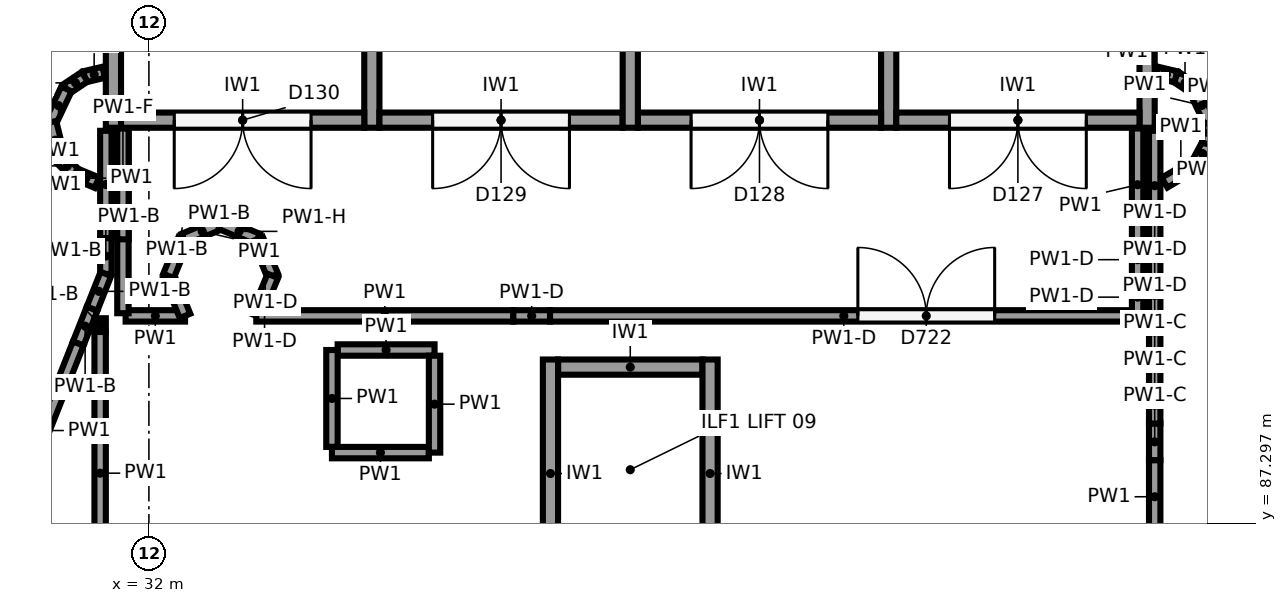
"""IFC4 building model, lengths in metres.
Left out: names, types, materials, properties, quantities, classifications, styles, units other than length and angle.
Written with IfcOpenShell. Run it as: python <this file> out.ifc"""

import sys

from ifc_helpers import new_model, si_unit, direction, frame, frame_2d, origin, origin_2d, place, context, subcontext, project, spatial, rectangle, circle, extrude, element, fill, save


model = new_model("IFC4")
c1 = context("Model", 3, precision=1e-05, world=origin(), true_north=direction((0.0, 1.0)))
c2 = subcontext(c1, "Body", "Model", "MODEL_VIEW")
j1 = project(units=[si_unit("LENGTHUNIT", "METRE"), si_unit("PLANEANGLEUNIT", "RADIAN")], contexts=[c1])
p1 = place(None, origin())
s1 = spatial("IfcSite", under=j1, at=p1, CompositionType="ELEMENT")
p2 = place(p1, origin())
s2 = spatial("IfcBuilding", under=s1, at=p2, CompositionType="ELEMENT")
p3 = place(p2, frame((0.0, 0.0, -4.0)))
s3 = spatial("IfcBuildingStorey", under=s2, at=p3, CompositionType="ELEMENT", Elevation=-4.0)
p4 = place(p3, frame((46.333, 90.126, -1.2), z_axis=(0.0, 0.0, 1.0), x_axis=(1.0, 0.0, 0.0)))
e1 = element("IfcColumn", 1, at=p4, inside=s3, PredefinedType="COLUMN", context=c2, shape_type="SweptSolid", body=[
    extrude(circle(Radius=0.45, at=origin_2d()), origin(), (0.0, 0.0, 1.0), 5.2),
])
p5 = place(p3, frame((32.944, 90.551, -1.2), z_axis=(0.0, 0.0, 1.0), x_axis=(1.0, 0.0, 0.0)))
e2 = element("IfcColumn", 2, at=p5, inside=s3, PredefinedType="COLUMN", context=c2, shape_type="SweptSolid", body=[
    extrude(circle(Radius=0.55, at=origin_2d()), origin(), (0.0, 0.0, 1.0), 5.2),
])
for number, where, z_axis, x_axis in (
    (3, (45.133, 101.6, -1.2), (0.0, 0.0, 1.0), (0.0, -1.0, 0.0)),
    (4, (38.333, 101.6, -1.2), (0.0, 0.0, 1.0), (0.0, -1.0, 0.0)),
    (5, (31.533, 101.6, -1.2), (0.0, 0.0, 1.0), (0.0, -1.0, 0.0)),
    (6, (41.733, 101.6, -1.2), (0.0, 0.0, 1.0), (0.0, -1.0, 0.0)),
    (7, (34.933, 101.6, -1.2), (0.0, 0.0, 1.0), (0.0, -1.0, 0.0)),
):
    element("IfcWall", number, at=place(p3, frame(where, z_axis=z_axis, x_axis=x_axis)), inside=s3, PredefinedType="SHEAR", context=c2, shape_type="SweptSolid", body=[
        extrude(rectangle(XDim=9.1, YDim=0.2, at=frame_2d((4.55, 0.0))), origin(), (0.0, 0.0, 1.0), 4.8),
    ])
p6 = place(p3, frame((45.033, 92.6, -1.2), z_axis=(0.0, 0.0, 1.0), x_axis=(-1.0, 0.0, 0.0)))
e8 = element("IfcWall", 8, at=p6, inside=s3, PredefinedType="SHEAR", context=c2, shape_type="SweptSolid", body=[
    extrude(rectangle(XDim=3.2, YDim=0.2, at=frame_2d((1.6, 0.0))), origin(), (0.0, 0.0, 1.0), 4.8),
])
p7 = place(p6, frame((0.7, 0.0, 1.2)))
e9 = element("IfcOpeningElement", 9, at=p7, cuts=e8, PredefinedType="OPENING", context=c2, shape_type="SweptSolid", body=[
    extrude(rectangle(XDim=1.8, YDim=2.1, at=frame_2d((0.9, 1.05))), frame((0.0, 0.11, 0.0), z_axis=(0.0, -1.0, 0.0), x_axis=(1.0, 0.0, 0.0)), (0.0, 0.0, 1.0), 0.22),
])
p8 = place(p3, frame((41.633, 92.6, -1.2), z_axis=(0.0, 0.0, 1.0), x_axis=(-1.0, 0.0, 0.0)))
e10 = element("IfcWall", 10, at=p8, inside=s3, PredefinedType="SHEAR", context=c2, shape_type="SweptSolid", body=[
    extrude(rectangle(XDim=3.2, YDim=0.2, at=frame_2d((1.6, 0.0))), origin(), (0.0, 0.0, 1.0), 4.8),
])
p9 = place(p8, frame((0.7, 0.0, 1.2)))
e11 = element("IfcOpeningElement", 11, at=p9, cuts=e10, PredefinedType="OPENING", context=c2, shape_type="SweptSolid", body=[
    extrude(rectangle(XDim=1.8, YDim=2.1, at=frame_2d((0.9, 1.05))), frame((0.0, 0.11, 0.0), z_axis=(0.0, -1.0, 0.0), x_axis=(1.0, 0.0, 0.0)), (0.0, 0.0, 1.0), 0.22),
])
p10 = place(p3, frame((38.233, 92.6, -1.2), z_axis=(0.0, 0.0, 1.0), x_axis=(-1.0, 0.0, 0.0)))
e12 = element("IfcWall", 12, at=p10, inside=s3, PredefinedType="SHEAR", context=c2, shape_type="SweptSolid", body=[
    extrude(rectangle(XDim=3.2, YDim=0.2, at=frame_2d((1.6, 0.0))), origin(), (0.0, 0.0, 1.0), 4.8),
])
p11 = place(p10, frame((0.7, 0.0, 1.2)))
e13 = element("IfcOpeningElement", 13, at=p11, cuts=e12, PredefinedType="OPENING", context=c2, shape_type="SweptSolid", body=[
    extrude(rectangle(XDim=1.8, YDim=2.1, at=frame_2d((0.9, 1.05))), frame((0.0, 0.11, 0.0), z_axis=(0.0, -1.0, 0.0), x_axis=(1.0, 0.0, 0.0)), (0.0, 0.0, 1.0), 0.22),
])
p12 = place(p3, frame((34.833, 92.6, -1.2), z_axis=(0.0, 0.0, 1.0), x_axis=(-1.0, 0.0, 0.0)))
e14 = element("IfcWall", 14, at=p12, inside=s3, PredefinedType="SHEAR", context=c2, shape_type="SweptSolid", body=[
    extrude(rectangle(XDim=3.2, YDim=0.2, at=frame_2d((1.6, 0.0))), origin(), (0.0, 0.0, 1.0), 4.8),
])
p13 = place(p12, frame((0.7, 0.0, 1.2)))
e15 = element("IfcOpeningElement", 15, at=p13, cuts=e14, PredefinedType="OPENING", context=c2, shape_type="SweptSolid", body=[
    extrude(rectangle(XDim=1.8, YDim=2.1, at=frame_2d((0.9, 1.05))), frame((0.0, 0.11, 0.0), z_axis=(0.0, -1.0, 0.0), x_axis=(1.0, 0.0, 0.0)), (0.0, 0.0, 1.0), 0.22),
])
for number, where, z_axis, x_axis in (
    (16, (39.383, 89.451, -1.2), (0.0, 0.0, 1.0), (0.0, -1.0, 0.0)),
    (17, (37.283, 89.451, -1.2), (0.0, 0.0, 1.0), (0.0, -1.0, 0.0)),
):
    element("IfcWall", number, at=place(p3, frame(where, z_axis=z_axis, x_axis=x_axis)), inside=s3, PredefinedType="SHEAR", context=c2, shape_type="SweptSolid", body=[
        extrude(rectangle(XDim=3.0, YDim=0.2, at=frame_2d((1.5, 0.0))), origin(), (0.0, 0.0, 1.0), 4.8),
    ])
p14 = place(p3, frame((39.283, 89.351, -1.2), z_axis=(0.0, 0.0, 1.0), x_axis=(-1.0, 0.0, 0.0)))
e18 = element("IfcWall", 18, at=p14, inside=s3, PredefinedType="SHEAR", context=c2, shape_type="SweptSolid", body=[
    extrude(rectangle(XDim=1.9, YDim=0.2, at=frame_2d((0.95, 0.0))), origin(), (0.0, 0.0, 1.0), 4.8),
])
p15 = place(p3, frame((45.233, 87.164, 0.0), z_axis=(0.0, 0.0, 1.0), x_axis=(0.0, 1.0, 0.0)))
e19 = element("IfcWall", 19, at=p15, inside=s3, PredefinedType="PARTITIONING", context=c2, shape_type="SweptSolid", body=[
    extrude(rectangle(XDim=0.963, YDim=0.15, at=frame_2d((0.481, 0.0))), origin(), (0.0, 0.0, 1.0), 3.6),
])
for number, where, z_axis, x_axis in (
    (20, (45.233, 88.127, 0.0), (0.0, 0.0, 1.0), (0.0, 1.0, 0.0)),
    (21, (45.233, 88.608, 0.0), (0.0, 0.0, 1.0), (0.0, 1.0, 0.0)),
    (22, (45.233, 89.09, 0.0), (0.0, 0.0, 1.0), (0.0, 1.0, 0.0)),
):
    element("IfcWall", number, at=place(p3, frame(where, z_axis=z_axis, x_axis=x_axis)), inside=s3, PredefinedType="PARTITIONING", context=c2, shape_type="SweptSolid", body=[
        extrude(rectangle(XDim=0.481, YDim=0.15, at=frame_2d((0.241, 0.0))), origin(), (0.0, 0.0, 1.0), 2.7),
    ])
for number, where, z_axis, x_axis in (
    (23, (45.233, 89.571, 0.0), (0.0, 0.0, 1.0), (0.0, 1.0, 0.0)),
    (24, (45.233, 90.053, 0.0), (0.0, 0.0, 1.0), (0.0, 1.0, 0.0)),
    (25, (45.233, 90.534, 0.0), (0.0, 0.0, 1.0), (0.0, 1.0, 0.0)),
):
    element("IfcWall", number, at=place(p3, frame(where, z_axis=z_axis, x_axis=x_axis)), inside=s3, PredefinedType="PARTITIONING", context=c2, shape_type="SweptSolid", body=[
        extrude(rectangle(XDim=0.481, YDim=0.15, at=frame_2d((0.241, 0.0))), origin(), (0.0, 0.0, 1.0), 2.3),
    ])
p16 = place(p3, frame((45.233, 91.016, 0.0), z_axis=(0.0, 0.0, 1.0), x_axis=(0.0, 1.0, 0.0)))
e26 = element("IfcWall", 26, at=p16, inside=s3, PredefinedType="PARTITIONING", context=c2, shape_type="SweptSolid", body=[
    extrude(rectangle(XDim=1.444, YDim=0.15, at=frame_2d((0.722, 0.0))), origin(), (0.0, 0.0, 1.0), 3.6),
])
p17 = place(p3, frame((31.433, 92.46, 0.0), z_axis=(0.0, 0.0, 1.0), x_axis=(0.0, -1.0, 0.0)))
e27 = element("IfcWall", 27, at=p17, inside=s3, PredefinedType="PARTITIONING", context=c2, shape_type="SweptSolid", body=[
    extrude(rectangle(XDim=1.413, YDim=0.15, at=frame_2d((0.706, 0.0))), origin(), (0.0, 0.0, 1.0), 3.6),
])
p18 = place(p3, frame((31.433, 91.047, 0.0), z_axis=(0.0, 0.0, 1.0), x_axis=(0.0, -1.0, 0.0)))
e28 = element("IfcWall", 28, at=p18, inside=s3, PredefinedType="PARTITIONING", context=c2, shape_type="SweptSolid", body=[
    extrude(rectangle(XDim=0.471, YDim=0.15, at=frame_2d((0.235, 0.0))), origin(), (0.0, 0.0, 1.0), 2.5),
])
for number, where, z_axis, x_axis in (
    (29, (31.433, 90.577, 0.0), (0.0, 0.0, 1.0), (-0.369, -0.929, 0.0)),
    (30, (31.252, 90.119, 0.0), (0.0, 0.0, 1.0), (-0.369, -0.929, 0.0)),
):
    element("IfcWall", number, at=place(p3, frame(where, z_axis=z_axis, x_axis=x_axis)), inside=s3, PredefinedType="PARTITIONING", context=c2, shape_type="SweptSolid", body=[
        extrude(rectangle(XDim=0.492, YDim=0.15, at=frame_2d((0.246, 0.0))), origin(), (0.0, 0.0, 1.0), 2.5),
    ])
p19 = place(p3, frame((31.07, 89.661, 0.0), z_axis=(0.0, 0.0, 1.0), x_axis=(-0.368825125467, -0.9294988041, 0.0)))
e31 = element("IfcWall", 31, at=p19, inside=s3, PredefinedType="PARTITIONING", context=c2, shape_type="SweptSolid", body=[
    extrude(rectangle(XDim=2.462, YDim=0.15, at=frame_2d((1.231, 0.0))), origin(), (0.0, 0.0, 1.0), 3.6),
])
p20 = place(p3, frame((35.758, 89.576, 0.0), z_axis=(0.0, 0.0, 1.0), x_axis=(-1.0, 0.0, 0.0)))
e32 = element("IfcWall", 32, at=p20, inside=s3, PredefinedType="PARTITIONING", context=c2, shape_type="SweptSolid", body=[
    extrude(rectangle(XDim=1.275, YDim=0.15, at=frame_2d((0.637, 0.0))), origin(), (0.0, 0.0, 1.0), 3.6),
])
for number, where, z_axis, x_axis in (
    (33, (34.408, 89.576, 0.0), (0.0, 0.0, 1.0), (0.0, -1.0, 0.0)),
    (34, (34.408, 88.226, 0.0), (0.0, 0.0, 1.0), (1.0, 0.0, 0.0)),
    (35, (35.758, 88.226, 0.0), (0.0, 0.0, 1.0), (0.0, 1.0, 0.0)),
):
    element("IfcWall", number, at=place(p3, frame(where, z_axis=z_axis, x_axis=x_axis)), inside=s3, PredefinedType="PARTITIONING", context=c2, shape_type="SweptSolid", body=[
        extrude(rectangle(XDim=1.275, YDim=0.15, at=frame_2d((0.638, 0.0))), origin(), (0.0, 0.0, 1.0), 3.6),
    ])
p21 = place(p3, frame((31.693, 90.025, 0.0), z_axis=(0.0, 0.0, 1.0), x_axis=(1.0, 0.0, 0.0)))
e36 = element("IfcWall", 36, at=p21, inside=s3, PredefinedType="PARTITIONING", context=c2, shape_type="SweptSolid", body=[
    extrude(rectangle(XDim=0.782, YDim=0.15, at=frame_2d((0.391, 0.0))), origin(), (0.0, 0.0, 1.0), 3.6),
])
p22 = place(p3, frame((32.475, 90.025, 0.0), z_axis=(0.0, 0.0, 1.0), x_axis=(-0.382452777268, 0.923975039252, 0.0)))
e37 = element("IfcWall", 37, at=p22, inside=s3, PredefinedType="PARTITIONING", context=c2, shape_type="SweptSolid", body=[
    extrude(rectangle(XDim=0.569, YDim=0.15, at=frame_2d((0.285, 0.0))), origin(), (0.0, 0.0, 1.0), 2.5),
])
p23 = place(p3, frame((32.258, 90.551, 0.0), z_axis=(0.0, 0.0, 1.0), x_axis=(0.382666625355, 0.923886494024, 0.0)))
e38 = element("IfcWall", 38, at=p23, inside=s3, PredefinedType="PARTITIONING", context=c2, shape_type="SweptSolid", body=[
    extrude(rectangle(XDim=0.525, YDim=0.15, at=frame_2d((0.263, 0.0))), origin(), (0.0, 0.0, 1.0), 2.5),
])
p24 = place(p3, frame((32.458, 91.036, 0.0), z_axis=(0.0, 0.0, 1.0), x_axis=(0.923694016012, 0.383131002117, 0.0)))
e39 = element("IfcWall", 39, at=p24, inside=s3, PredefinedType="PARTITIONING", context=c2, shape_type="SweptSolid", body=[
    extrude(rectangle(XDim=0.526, YDim=0.15, at=frame_2d((0.263, 0.0))), origin(), (0.0, 0.0, 1.0), 3.6),
])
p25 = place(p3, frame((32.944, 91.238, 0.0), z_axis=(0.0, 0.0, 1.0), x_axis=(0.923625802966, -0.383295416221, 0.0)))
e40 = element("IfcWall", 40, at=p25, inside=s3, PredefinedType="PARTITIONING", context=c2, shape_type="SweptSolid", body=[
    extrude(rectangle(XDim=0.525, YDim=0.15, at=frame_2d((0.263, 0.0))), origin(), (0.0, 0.0, 1.0), 3.0),
])
p26 = place(p3, frame((33.429, 91.036, 0.0), z_axis=(0.0, 0.0, 1.0), x_axis=(0.382666625355, -0.923886494024, 0.0)))
e41 = element("IfcWall", 41, at=p26, inside=s3, PredefinedType="PARTITIONING", context=c2, shape_type="SweptSolid", body=[
    extrude(rectangle(XDim=0.525, YDim=0.15, at=frame_2d((0.263, 0.0))), origin(), (0.0, 0.0, 1.0), 2.3),
])
p27 = place(p3, frame((33.63, 90.551, 0.0), z_axis=(0.0, 0.0, 1.0), x_axis=(-0.382452777268, -0.923975039252, 0.0)))
e42 = element("IfcWall", 42, at=p27, inside=s3, PredefinedType="PARTITIONING", context=c2, shape_type="SweptSolid", body=[
    extrude(rectangle(XDim=0.569, YDim=0.15, at=frame_2d((0.285, 0.0))), origin(), (0.0, 0.0, 1.0), 2.3),
])
p28 = place(p3, frame((33.413, 90.025, 0.0), z_axis=(0.0, 0.0, 1.0), x_axis=(1.0, 0.0, 0.0)))
e43 = element("IfcWall", 43, at=p28, inside=s3, PredefinedType="PARTITIONING", context=c2, shape_type="SweptSolid", body=[
    extrude(rectangle(XDim=3.382, YDim=0.15, at=frame_2d((1.691, 0.0))), origin(), (0.0, 0.0, 1.0), 3.6),
])
p29 = place(p3, frame((36.795, 90.025, 0.0), z_axis=(0.0, 0.0, 1.0), x_axis=(1.0, 0.0, 0.0)))
e44 = element("IfcWall", 44, at=p29, inside=s3, PredefinedType="PARTITIONING", context=c2, shape_type="SweptSolid", body=[
    extrude(rectangle(XDim=0.483, YDim=0.15, at=frame_2d((0.242, 0.0))), origin(), (0.0, 0.0, 1.0), 2.3),
])
p30 = place(p3, frame((37.278, 90.025, 0.0), z_axis=(0.0, 0.0, 1.0), x_axis=(1.0, 0.0, 0.0)))
e45 = element("IfcWall", 45, at=p30, inside=s3, PredefinedType="PARTITIONING", context=c2, shape_type="SweptSolid", body=[
    extrude(rectangle(XDim=7.73, YDim=0.15, at=frame_2d((3.865, 0.0))), origin(), (0.0, 0.0, 1.0), 2.3),
])
p31 = place(p30, frame((4.05, 0.0, 0.0)))
e46 = element("IfcOpeningElement", 46, at=p31, cuts=e45, PredefinedType="OPENING", context=c2, shape_type="SweptSolid", body=[
    extrude(rectangle(XDim=1.8, YDim=2.1, at=frame_2d((0.9, 1.05))), frame((0.0, 0.085, 0.0), z_axis=(0.0, -1.0, 0.0), x_axis=(1.0, 0.0, 0.0)), (0.0, 0.0, 1.0), 0.17),
])
p32 = place(p3, frame((45.008, 90.025, 0.0), z_axis=(0.0, 0.0, 1.0), x_axis=(0.0, 1.0, 0.0)))
e47 = element("IfcWall", 47, at=p32, inside=s3, PredefinedType="PARTITIONING", context=c2, shape_type="SweptSolid", body=[
    extrude(rectangle(XDim=0.493, YDim=0.15, at=frame_2d((0.247, 0.0))), origin(), (0.0, 0.0, 1.0), 2.3),
])
p33 = place(p3, frame((45.008, 90.518, 0.0), z_axis=(0.0, 0.0, 1.0), x_axis=(0.0, 1.0, 0.0)))
e48 = element("IfcWall", 48, at=p33, inside=s3, PredefinedType="PARTITIONING", context=c2, shape_type="SweptSolid", body=[
    extrude(rectangle(XDim=0.493, YDim=0.15, at=frame_2d((0.247, 0.0))), origin(), (0.0, 0.0, 1.0), 2.3),
])
p34 = place(p3, frame((45.008, 91.011, 0.0), z_axis=(0.0, 0.0, 1.0), x_axis=(0.0, 1.0, 0.0)))
e49 = element("IfcWall", 49, at=p34, inside=s3, PredefinedType="PARTITIONING", context=c2, shape_type="SweptSolid", body=[
    extrude(rectangle(XDim=1.479, YDim=0.15, at=frame_2d((0.74, 0.0))), origin(), (0.0, 0.0, 1.0), 3.6),
])
p35 = place(p3, frame((31.658, 92.49, 0.0), z_axis=(0.0, 0.0, 1.0), x_axis=(0.0, -1.0, 0.0)))
e50 = element("IfcWall", 50, at=p35, inside=s3, PredefinedType="PARTITIONING", context=c2, shape_type="SweptSolid", body=[
    extrude(rectangle(XDim=2.43, YDim=0.15, at=frame_2d((1.215, 0.0))), origin(), (0.0, 0.0, 1.0), 2.5),
])
p36 = place(p3, frame((31.658, 92.49, 2.5), z_axis=(0.0, 0.0, 1.0), x_axis=(0.0, -1.0, 0.0)))
e51 = element("IfcWall", 51, at=p36, inside=s3, PredefinedType="PARTITIONING", context=c2, shape_type="SweptSolid", body=[
    extrude(rectangle(XDim=1.458, YDim=0.15, at=frame_2d((0.729, 0.0))), origin(), (0.0, 0.0, 1.0), 1.1),
])
p37 = place(p3, frame((31.358, 89.994, 0.0), z_axis=(0.0, 0.0, 1.0), x_axis=(0.0, -1.0, 0.0)))
e52 = element("IfcWall", 52, at=p37, inside=s3, PredefinedType="PARTITIONING", context=c2, shape_type="SweptSolid", body=[
    extrude(rectangle(XDim=0.181, YDim=0.15, at=frame_2d((0.09, 0.0))), origin(), (0.0, 0.0, 1.0), 2.5),
])
p38 = place(p3, frame((31.358, 89.813, 0.0), z_axis=(0.0, 0.0, 1.0), x_axis=(0.0, -1.0, 0.0)))
e53 = element("IfcWall", 53, at=p38, inside=s3, PredefinedType="PARTITIONING", context=c2, shape_type="SweptSolid", body=[
    extrude(rectangle(XDim=3.715, YDim=0.15, at=frame_2d((1.857, 0.0))), origin(), (0.0, 0.0, 1.0), 3.6),
])
p39 = place(p3, frame((45.362, 91.777, 0.0), z_axis=(0.0, 0.0, 1.0), x_axis=(0.85856712863, 0.512701166017, 0.0)))
e54 = element("IfcWall", 54, at=p39, inside=s3, PredefinedType="PARTITIONING", context=c2, shape_type="SweptSolid", body=[
    extrude(rectangle(XDim=0.5, YDim=0.15, at=frame_2d((0.25, 0.0))), origin(), (0.0, 0.0, 1.0), 3.6),
])
p40 = place(p3, frame((45.792, 92.034, 0.0), z_axis=(0.0, 0.0, 1.0), x_axis=(0.471682765858, 0.881768319, 0.0)))
e55 = element("IfcWall", 55, at=p40, inside=s3, PredefinedType="PARTITIONING", context=c2, shape_type="SweptSolid", body=[
    extrude(rectangle(XDim=0.289, YDim=0.15, at=frame_2d((0.145, 0.0))), origin(), (0.0, 0.0, 1.0), 3.6),
])
p41 = place(p3, frame((45.928, 92.289, 0.0), z_axis=(0.0, 0.0, 1.0), x_axis=(0.0978334953, 0.99520279702, 0.0)))
e56 = element("IfcWall", 56, at=p41, inside=s3, PredefinedType="PARTITIONING", context=c2, shape_type="SweptSolid", body=[
    extrude(rectangle(XDim=0.29, YDim=0.15, at=frame_2d((0.145, 0.0))), origin(), (0.0, 0.0, 1.0), 3.6),
])
p42 = place(p3, frame((45.957, 92.577, 0.0), z_axis=(0.0, 0.0, 1.0), x_axis=(-0.427757963167, 0.903893315025, 0.0)))
e57 = element("IfcWall", 57, at=p42, inside=s3, PredefinedType="PARTITIONING", context=c2, shape_type="SweptSolid", body=[
    extrude(rectangle(XDim=0.479, YDim=0.15, at=frame_2d((0.24, 0.0))), origin(), (0.0, 0.0, 1.0), 3.6),
])
p43 = place(p3, frame((45.752, 93.01, 0.0), z_axis=(0.0, 0.0, 1.0), x_axis=(-0.831397130511, 0.555678694372, 0.0)))
e58 = element("IfcWall", 58, at=p43, inside=s3, PredefinedType="PARTITIONING", context=c2, shape_type="SweptSolid", body=[
    extrude(rectangle(XDim=0.288, YDim=0.15, at=frame_2d((0.144, 0.0))), origin(), (0.0, 0.0, 1.0), 3.6),
])
for number, where, z_axis, x_axis in (
    (59, (45.512, 93.17, 0.0), (0.0, 0.0, 1.0), (-0.973, 0.23, 0.0)),
    (60, (31.405, 93.23, 0.0), (0.0, 0.0, 1.0), (-0.973, -0.23, 0.0)),
):
    element("IfcWall", number, at=place(p3, frame(where, z_axis=z_axis, x_axis=x_axis)), inside=s3, PredefinedType="PARTITIONING", context=c2, shape_type="SweptSolid", body=[
        extrude(rectangle(XDim=0.258, YDim=0.15, at=frame_2d((0.129, 0.0))), origin(), (0.0, 0.0, 1.0), 3.6),
    ])
p44 = place(p3, frame((31.154, 93.17, 0.0), z_axis=(0.0, 0.0, 1.0), x_axis=(-0.831397130511, -0.555678694372, 0.0)))
e61 = element("IfcWall", 61, at=p44, inside=s3, PredefinedType="PARTITIONING", context=c2, shape_type="SweptSolid", body=[
    extrude(rectangle(XDim=0.288, YDim=0.15, at=frame_2d((0.144, 0.0))), origin(), (0.0, 0.0, 1.0), 3.6),
])
for number, where, z_axis, x_axis in (
    (62, (30.915, 93.01, 0.0), (0.0, 0.0, 1.0), (-0.428, -0.904, 0.0)),
    (63, (30.707, 92.572, 0.0), (0.0, 0.0, 1.0), (0.243, -0.97, 0.0)),
):
    element("IfcWall", number, at=place(p3, frame(where, z_axis=z_axis, x_axis=x_axis)), inside=s3, PredefinedType="PARTITIONING", context=c2, shape_type="SweptSolid", body=[
        extrude(rectangle(XDim=0.486, YDim=0.15, at=frame_2d((0.243, 0.0))), origin(), (0.0, 0.0, 1.0), 3.6),
    ])
p45 = place(p3, frame((30.825, 92.101, 0.0), z_axis=(0.0, 0.0, 1.0), x_axis=(0.707106781187, -0.707106781187, 0.0)))
e64 = element("IfcWall", 64, at=p45, inside=s3, PredefinedType="PARTITIONING", context=c2, shape_type="SweptSolid", body=[
    extrude(rectangle(XDim=0.289, YDim=0.15, at=frame_2d((0.145, 0.0))), origin(), (0.0, 0.0, 1.0), 3.6),
])
p46 = place(p3, frame((31.03, 91.896, 0.0), z_axis=(0.0, 0.0, 1.0), x_axis=(0.923707957869, -0.383097387839, 0.0)))
e65 = element("IfcWall", 65, at=p46, inside=s3, PredefinedType="PARTITIONING", context=c2, shape_type="SweptSolid", body=[
    extrude(rectangle(XDim=0.308, YDim=0.15, at=frame_2d((0.154, 0.0))), origin(), (0.0, 0.0, 1.0), 3.6),
])
p47 = place(p7, origin())
e66 = element("IfcDoor", 66, at=p47, inside=s3, OperationType="DOUBLE_DOOR_SINGLE_SWING", PredefinedType="DOOR", context=c2, shape_type="SweptSolid", body=[
    extrude(rectangle(XDim=1.8, YDim=2.1, at=frame_2d((0.9, 1.05))), frame((0.0, 0.025, 0.0), z_axis=(0.0, -1.0, 0.0), x_axis=(1.0, 0.0, 0.0)), (0.0, 0.0, 1.0), 0.05),
])
fill(e9, e66)
p48 = place(p9, origin())
e67 = element("IfcDoor", 67, at=p48, inside=s3, OperationType="DOUBLE_DOOR_SINGLE_SWING", PredefinedType="DOOR", context=c2, shape_type="SweptSolid", body=[
    extrude(rectangle(XDim=1.8, YDim=2.1, at=frame_2d((0.9, 1.05))), frame((0.0, 0.025, 0.0), z_axis=(0.0, -1.0, 0.0), x_axis=(1.0, 0.0, 0.0)), (0.0, 0.0, 1.0), 0.05),
])
fill(e11, e67)
p49 = place(p11, origin())
e68 = element("IfcDoor", 68, at=p49, inside=s3, OperationType="DOUBLE_DOOR_SINGLE_SWING", PredefinedType="DOOR", context=c2, shape_type="SweptSolid", body=[
    extrude(rectangle(XDim=1.8, YDim=2.1, at=frame_2d((0.9, 1.05))), frame((0.0, 0.025, 0.0), z_axis=(0.0, -1.0, 0.0), x_axis=(1.0, 0.0, 0.0)), (0.0, 0.0, 1.0), 0.05),
])
fill(e13, e68)
p50 = place(p13, origin())
e69 = element("IfcDoor", 69, at=p50, inside=s3, OperationType="DOUBLE_DOOR_SINGLE_SWING", PredefinedType="DOOR", context=c2, shape_type="SweptSolid", body=[
    extrude(rectangle(XDim=1.8, YDim=2.1, at=frame_2d((0.9, 1.05))), frame((0.0, 0.025, 0.0), z_axis=(0.0, -1.0, 0.0), x_axis=(1.0, 0.0, 0.0)), (0.0, 0.0, 1.0), 0.05),
])
fill(e15, e69)
p51 = place(p31, origin())
e70 = element("IfcDoor", 70, at=p51, inside=s3, OperationType="DOUBLE_DOOR_SINGLE_SWING", PredefinedType="DOOR", context=c2, shape_type="SweptSolid", body=[
    extrude(rectangle(XDim=1.8, YDim=2.1, at=frame_2d((0.9, 1.05))), frame((0.0, 0.025, 0.0), z_axis=(0.0, -1.0, 0.0), x_axis=(1.0, 0.0, 0.0)), (0.0, 0.0, 1.0), 0.05),
])
fill(e46, e70)
save(model, sys.argv[1])
